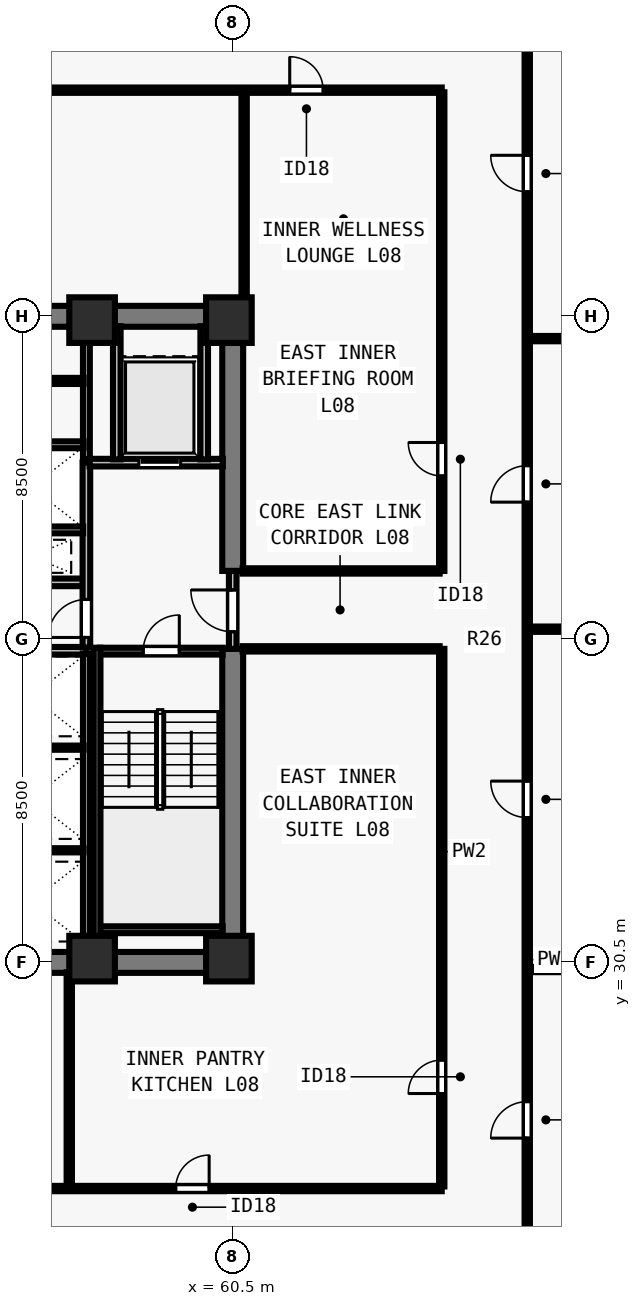
"""IFC4 building model, lengths in metres.
Left out: names, types, materials, properties, quantities, classifications, styles, units other than length and angle.
Written with IfcOpenShell. Run it as: python <this file> out.ifc"""

import sys

from ifc_helpers import new_model, si_unit, direction, frame, frame_2d, origin, origin_2d, place, context, subcontext, project, spatial, rectangle, extrude, element, fill, save


model = new_model("IFC4")
c1 = context("Model", 3, precision=1e-05, world=origin(), true_north=direction((0.0, 1.0)))
c2 = subcontext(c1, "Body", "Model", "MODEL_VIEW")
j1 = project(units=[si_unit("LENGTHUNIT", "METRE"), si_unit("PLANEANGLEUNIT", "RADIAN")], contexts=[c1])
p1 = place(None, origin())
s1 = spatial("IfcSite", under=j1, at=p1, CompositionType="ELEMENT")
p2 = place(p1, origin())
s2 = spatial("IfcBuilding", under=s1, at=p2, CompositionType="ELEMENT")
p3 = place(p2, frame((0.0, 0.0, 34.0)))
s3 = spatial("IfcBuildingStorey", under=s2, at=p3, CompositionType="ELEMENT", Elevation=34.0)
for number, where, z_axis, x_axis in (
    (1, (56.8, 30.6, 0.0), (0.0, 0.0, 1.0), (1.0, 0.0, 0.0)),
    (2, (60.4, 30.6, 0.0), (0.0, 0.0, 1.0), (1.0, 0.0, 0.0)),
    (3, (56.8, 47.4, 0.0), (0.0, 0.0, 1.0), (1.0, 0.0, 0.0)),
    (4, (60.4, 47.4, 0.0), (0.0, 0.0, 1.0), (1.0, 0.0, 0.0)),
):
    element("IfcColumn", number, at=place(p3, frame(where, z_axis=z_axis, x_axis=x_axis)), inside=s3, PredefinedType="COLUMN", context=c2, shape_type="SweptSolid", body=[
        extrude(rectangle(XDim=1.2, YDim=1.2, at=origin_2d()), origin(), (0.0, 0.0, 1.0), 3.5),
    ])
for number, where, z_axis, x_axis in (
    (5, (43.225, 30.5, 0.0), (0.0, 0.0, 1.0), (1.0, 0.0, 0.0)),
    (6, (43.225, 47.5, 0.0), (0.0, 0.0, 1.0), (1.0, 0.0, 0.0)),
):
    element("IfcWall", number, at=place(p3, frame(where, z_axis=z_axis, x_axis=x_axis)), inside=s3, PredefinedType="SHEAR", context=c2, shape_type="SweptSolid", body=[
        extrude(rectangle(XDim=17.55, YDim=0.55, at=frame_2d((8.775, 0.0))), origin(), (0.0, 0.0, 1.0), 3.28),
    ])
p4 = place(p3, frame((60.5, 30.765, 0.0), z_axis=(0.0, 0.0, 1.0), x_axis=(0.0, 1.0, 0.0)))
e7 = element("IfcWall", 7, at=p4, inside=s3, PredefinedType="SHEAR", context=c2, shape_type="SweptSolid", body=[
    extrude(rectangle(XDim=7.985, YDim=0.55, at=frame_2d((3.993, 0.0))), origin(), (0.0, 0.0, 1.0), 3.28),
])
p5 = place(p3, frame((60.5, 40.8, 0.0), z_axis=(0.0, 0.0, 1.0), x_axis=(0.0, 1.0, 0.0)))
e8 = element("IfcWall", 8, at=p5, inside=s3, PredefinedType="SHEAR", context=c2, shape_type="SweptSolid", body=[
    extrude(rectangle(XDim=6.435, YDim=0.55, at=frame_2d((3.218, 0.0))), origin(), (0.0, 0.0, 1.0), 3.28),
])
for number, where, z_axis, x_axis in (
    (9, (53.7, 38.7, 0.0), (0.0, 0.0, 1.0), (1.0, 0.0, 0.0)),
    (10, (53.7, 40.5, 0.0), (0.0, 0.0, 1.0), (1.0, 0.0, 0.0)),
):
    element("IfcWall", number, at=place(p3, frame(where, z_axis=z_axis, x_axis=x_axis)), inside=s3, PredefinedType="SOLIDWALL", context=c2, shape_type="SweptSolid", body=[
        extrude(rectangle(XDim=2.95, YDim=0.2, at=frame_2d((1.475, 0.0))), origin(), (0.0, 0.0, 1.0), 3.28),
    ])
p6 = place(p3, frame((60.5, 38.75, 0.0), z_axis=(0.0, 0.0, 1.0), x_axis=(0.0, 1.0, 0.0)))
e11 = element("IfcWall", 11, at=p6, inside=s3, PredefinedType="SOLIDWALL", context=c2, shape_type="SweptSolid", body=[
    extrude(rectangle(XDim=2.05, YDim=0.2, at=frame_2d((1.025, 0.0))), origin(), (0.0, 0.0, 1.0), 3.28),
])
p7 = place(p6, frame((0.45, 0.0, 0.0)))
e12 = element("IfcOpeningElement", 12, at=p7, cuts=e11, PredefinedType="OPENING", context=c2, shape_type="SweptSolid", body=[
    extrude(rectangle(XDim=1.1, YDim=2.15, at=frame_2d((0.55, 1.075))), frame((0.0, 0.11, 0.0), z_axis=(0.0, -1.0, 0.0), x_axis=(1.0, 0.0, 0.0)), (0.0, 0.0, 1.0), 0.22),
])
p8 = place(p3, frame((56.65, 38.785, 0.0), z_axis=(0.0, 0.0, 1.0), x_axis=(0.0, 1.0, 0.0)))
e13 = element("IfcWall", 13, at=p8, inside=s3, PredefinedType="SOLIDWALL", context=c2, shape_type="SweptSolid", body=[
    extrude(rectangle(XDim=4.865, YDim=0.2, at=frame_2d((2.433, 0.0))), origin(), (0.0, 0.0, 1.0), 3.28),
])
p9 = place(p8, frame((0.265, 0.0, 0.0)))
e14 = element("IfcOpeningElement", 14, at=p9, cuts=e13, PredefinedType="OPENING", context=c2, shape_type="SweptSolid", body=[
    extrude(rectangle(XDim=1.0, YDim=2.15, at=frame_2d((0.5, 1.075))), frame((0.0, 0.11, 0.0), z_axis=(0.0, -1.0, 0.0), x_axis=(1.0, 0.0, 0.0)), (0.0, 0.0, 1.0), 0.22),
])
p10 = place(p3, frame((56.735, 43.65, 0.0), z_axis=(0.0, 0.0, 1.0), x_axis=(1.0, 0.0, 0.0)))
e15 = element("IfcWall", 15, at=p10, inside=s3, PredefinedType="SOLIDWALL", context=c2, shape_type="SweptSolid", body=[
    extrude(rectangle(XDim=3.505, YDim=0.2, at=frame_2d((1.752, 0.0))), origin(), (0.0, 0.0, 1.0), 3.28),
])
p11 = place(p10, frame((1.295, 0.0, 0.0)))
e16 = element("IfcOpeningElement", 16, at=p11, cuts=e15, PredefinedType="OPENING", context=c2, shape_type="SweptSolid", body=[
    extrude(rectangle(XDim=1.1, YDim=2.2, at=frame_2d((0.55, 1.1))), frame((0.0, 0.11, 0.0), z_axis=(0.0, -1.0, 0.0), x_axis=(1.0, 0.0, 0.0)), (0.0, 0.0, 1.0), 0.22),
])
for number, where, z_axis, x_axis in (
    (17, (57.45, 43.735, 0.0), (0.0, 0.0, 1.0), (0.0, 1.0, 0.0)),
    (18, (59.75, 43.735, 0.0), (0.0, 0.0, 1.0), (0.0, 1.0, 0.0)),
):
    element("IfcWall", number, at=place(p3, frame(where, z_axis=z_axis, x_axis=x_axis)), inside=s3, PredefinedType="SOLIDWALL", context=c2, shape_type="SweptSolid", body=[
        extrude(rectangle(XDim=3.505, YDim=0.2, at=frame_2d((1.752, 0.0))), origin(), (0.0, 0.0, 1.0), 3.28),
    ])
p12 = place(p3, frame((56.65, 30.76, 0.0), z_axis=(0.0, 0.0, 1.0), x_axis=(0.0, 1.0, 0.0)))
e19 = element("IfcWall", 19, at=p12, inside=s3, PredefinedType="SOLIDWALL", context=c2, shape_type="SweptSolid", body=[
    extrude(rectangle(XDim=7.855, YDim=0.18, at=frame_2d((3.927, 0.0))), origin(), (0.0, 0.0, 1.0), 3.28),
])
for number, where, z_axis, x_axis in (
    (20, (53.785, 33.45, 0.0), (0.0, 0.0, 1.0), (1.0, 0.0, 0.0)),
    (21, (53.785, 36.15, 0.0), (0.0, 0.0, 1.0), (1.0, 0.0, 0.0)),
):
    element("IfcWall", number, at=place(p3, frame(where, z_axis=z_axis, x_axis=x_axis)), inside=s3, PredefinedType="PARTITIONING", context=c2, shape_type="SweptSolid", body=[
        extrude(rectangle(XDim=2.79, YDim=0.11, at=frame_2d((1.395, 0.0))), origin(), (0.0, 0.0, 1.0), 3.28),
    ])
p13 = place(p3, frame((56.65, 43.735, 0.0), z_axis=(0.0, 0.0, 1.0), x_axis=(0.0, 1.0, 0.0)))
e22 = element("IfcWall", 22, at=p13, inside=s3, PredefinedType="SOLIDWALL", context=c2, shape_type="SweptSolid", body=[
    extrude(rectangle(XDim=3.505, YDim=0.18, at=frame_2d((1.752, 0.0))), origin(), (0.0, 0.0, 1.0), 3.28),
])
p14 = place(p3, frame((53.785, 41.88, 0.0), z_axis=(0.0, 0.0, 1.0), x_axis=(1.0, 0.0, 0.0)))
e23 = element("IfcWall", 23, at=p14, inside=s3, PredefinedType="SOLIDWALL", context=c2, shape_type="SweptSolid", body=[
    extrude(rectangle(XDim=2.78, YDim=0.18, at=frame_2d((1.39, 0.0))), origin(), (0.0, 0.0, 1.0), 3.28),
])
p15 = place(p3, frame((53.785, 44.12, 0.0), z_axis=(0.0, 0.0, 1.0), x_axis=(1.0, 0.0, 0.0)))
e24 = element("IfcWall", 24, at=p15, inside=s3, PredefinedType="SOLIDWALL", context=c2, shape_type="SweptSolid", body=[
    extrude(rectangle(XDim=2.79, YDim=0.18, at=frame_2d((1.395, 0.0))), origin(), (0.0, 0.0, 1.0), 3.28),
])
p16 = place(p3, frame((53.785, 45.8, 0.0), z_axis=(0.0, 0.0, 1.0), x_axis=(1.0, 0.0, 0.0)))
e25 = element("IfcWall", 25, at=p16, inside=s3, PredefinedType="PARTITIONING", context=c2, shape_type="SweptSolid", body=[
    extrude(rectangle(XDim=2.79, YDim=0.16, at=frame_2d((1.395, 0.0))), origin(), (0.0, 0.0, 1.0), 3.28),
])
p17 = place(p3, frame((68.25, 22.355, 0.0), z_axis=(0.0, 0.0, 1.0), x_axis=(0.0, 1.0, 0.0)))
e26 = element("IfcWall", 26, at=p17, inside=s3, PredefinedType="PARTITIONING", context=c2, shape_type="SweptSolid", body=[
    extrude(rectangle(XDim=33.29, YDim=0.14, at=frame_2d((16.645, 0.0))), origin(), (0.0, 0.0, 1.0), 3.28),
])
p18 = place(p17, frame((3.522, 0.0, 0.0)))
e27 = element("IfcOpeningElement", 27, at=p18, cuts=e26, PredefinedType="OPENING", context=c2, shape_type="SweptSolid", body=[
    extrude(rectangle(XDim=0.96, YDim=2.12, at=frame_2d((0.48, 1.06))), frame((0.0, 0.08, 0.0), z_axis=(0.0, -1.0, 0.0), x_axis=(1.0, 0.0, 0.0)), (0.0, 0.0, 1.0), 0.16),
])
p19 = place(p17, frame((11.956, 0.0, 0.0)))
e28 = element("IfcOpeningElement", 28, at=p19, cuts=e26, PredefinedType="OPENING", context=c2, shape_type="SweptSolid", body=[
    extrude(rectangle(XDim=0.96, YDim=2.12, at=frame_2d((0.48, 1.06))), frame((0.0, 0.08, 0.0), z_axis=(0.0, -1.0, 0.0), x_axis=(1.0, 0.0, 0.0)), (0.0, 0.0, 1.0), 0.16),
])
p20 = place(p17, frame((20.256, 0.0, 0.0)))
e29 = element("IfcOpeningElement", 29, at=p20, cuts=e26, PredefinedType="OPENING", context=c2, shape_type="SweptSolid", body=[
    extrude(rectangle(XDim=0.96, YDim=2.12, at=frame_2d((0.48, 1.06))), frame((0.0, 0.08, 0.0), z_axis=(0.0, -1.0, 0.0), x_axis=(1.0, 0.0, 0.0)), (0.0, 0.0, 1.0), 0.16),
])
p21 = place(p17, frame((28.422, 0.0, 0.0)))
e30 = element("IfcOpeningElement", 30, at=p21, cuts=e26, PredefinedType="OPENING", context=c2, shape_type="SweptSolid", body=[
    extrude(rectangle(XDim=0.96, YDim=2.12, at=frame_2d((0.48, 1.06))), frame((0.0, 0.08, 0.0), z_axis=(0.0, -1.0, 0.0), x_axis=(1.0, 0.0, 0.0)), (0.0, 0.0, 1.0), 0.16),
])
p22 = place(p3, frame((38.0, 24.55, 0.0), z_axis=(0.0, 0.0, 1.0), x_axis=(1.0, 0.0, 0.0)))
e31 = element("IfcWall", 31, at=p22, inside=s3, PredefinedType="PARTITIONING", context=c2, shape_type="SweptSolid", body=[
    extrude(rectangle(XDim=28.0, YDim=0.14, at=frame_2d((14.0, 0.0))), origin(), (0.0, 0.0, 1.0), 3.28),
])
p23 = place(p22, frame((1.2, 0.0, 0.0)))
e32 = element("IfcOpeningElement", 32, at=p23, cuts=e31, PredefinedType="OPENING", context=c2, shape_type="SweptSolid", body=[
    extrude(rectangle(XDim=0.88, YDim=2.1, at=frame_2d((0.44, 1.05))), frame((0.0, 0.08, 0.0), z_axis=(0.0, -1.0, 0.0), x_axis=(1.0, 0.0, 0.0)), (0.0, 0.0, 1.0), 0.16),
])
p24 = place(p22, frame((10.5, 0.0, 0.0)))
e33 = element("IfcOpeningElement", 33, at=p24, cuts=e31, PredefinedType="OPENING", context=c2, shape_type="SweptSolid", body=[
    extrude(rectangle(XDim=0.88, YDim=2.1, at=frame_2d((0.44, 1.05))), frame((0.0, 0.08, 0.0), z_axis=(0.0, -1.0, 0.0), x_axis=(1.0, 0.0, 0.0)), (0.0, 0.0, 1.0), 0.16),
])
p25 = place(p22, frame((21.0, 0.0, 0.0)))
e34 = element("IfcOpeningElement", 34, at=p25, cuts=e31, PredefinedType="OPENING", context=c2, shape_type="SweptSolid", body=[
    extrude(rectangle(XDim=0.88, YDim=2.1, at=frame_2d((0.44, 1.05))), frame((0.0, 0.08, 0.0), z_axis=(0.0, -1.0, 0.0), x_axis=(1.0, 0.0, 0.0)), (0.0, 0.0, 1.0), 0.16),
])
p26 = place(p3, frame((38.0, 53.45, 0.0), z_axis=(0.0, 0.0, 1.0), x_axis=(1.0, 0.0, 0.0)))
e35 = element("IfcWall", 35, at=p26, inside=s3, PredefinedType="PARTITIONING", context=c2, shape_type="SweptSolid", body=[
    extrude(rectangle(XDim=28.0, YDim=0.14, at=frame_2d((14.0, 0.0))), origin(), (0.0, 0.0, 1.0), 3.28),
])
p27 = place(p26, frame((2.2, 0.0, 0.0)))
e36 = element("IfcOpeningElement", 36, at=p27, cuts=e35, PredefinedType="OPENING", context=c2, shape_type="SweptSolid", body=[
    extrude(rectangle(XDim=0.88, YDim=2.1, at=frame_2d((0.44, 1.05))), frame((0.0, 0.08, 0.0), z_axis=(0.0, -1.0, 0.0), x_axis=(1.0, 0.0, 0.0)), (0.0, 0.0, 1.0), 0.16),
])
p28 = place(p26, frame((14.5, 0.0, 0.0)))
e37 = element("IfcOpeningElement", 37, at=p28, cuts=e35, PredefinedType="OPENING", context=c2, shape_type="SweptSolid", body=[
    extrude(rectangle(XDim=0.88, YDim=2.1, at=frame_2d((0.44, 1.05))), frame((0.0, 0.08, 0.0), z_axis=(0.0, -1.0, 0.0), x_axis=(1.0, 0.0, 0.0)), (0.0, 0.0, 1.0), 0.16),
])
p29 = place(p26, frame((24.0, 0.0, 0.0)))
e38 = element("IfcOpeningElement", 38, at=p29, cuts=e35, PredefinedType="OPENING", context=c2, shape_type="SweptSolid", body=[
    extrude(rectangle(XDim=0.88, YDim=2.1, at=frame_2d((0.44, 1.05))), frame((0.0, 0.08, 0.0), z_axis=(0.0, -1.0, 0.0), x_axis=(1.0, 0.0, 0.0)), (0.0, 0.0, 1.0), 0.16),
])
p30 = place(p3, frame((66.0, 24.605, 0.0), z_axis=(0.0, 0.0, 1.0), x_axis=(0.0, 1.0, 0.0)))
e39 = element("IfcWall", 39, at=p30, inside=s3, PredefinedType="PARTITIONING", context=c2, shape_type="SweptSolid", body=[
    extrude(rectangle(XDim=14.145, YDim=0.14, at=frame_2d((7.073, 0.0))), origin(), (0.0, 0.0, 1.0), 3.28),
])
p31 = place(p30, frame((2.445, 0.0, 0.0)))
e40 = element("IfcOpeningElement", 40, at=p31, cuts=e39, PredefinedType="OPENING", context=c2, shape_type="SweptSolid", body=[
    extrude(rectangle(XDim=0.88, YDim=2.1, at=frame_2d((0.44, 1.05))), frame((0.0, 0.08, 0.0), z_axis=(0.0, -1.0, 0.0), x_axis=(1.0, 0.0, 0.0)), (0.0, 0.0, 1.0), 0.16),
])
p32 = place(p3, frame((66.0, 40.8, 0.0), z_axis=(0.0, 0.0, 1.0), x_axis=(0.0, 1.0, 0.0)))
e41 = element("IfcWall", 41, at=p32, inside=s3, PredefinedType="PARTITIONING", context=c2, shape_type="SweptSolid", body=[
    extrude(rectangle(XDim=12.595, YDim=0.14, at=frame_2d((6.297, 0.0))), origin(), (0.0, 0.0, 1.0), 3.28),
])
p33 = place(p32, frame((2.5, 0.0, 0.0)))
e42 = element("IfcOpeningElement", 42, at=p33, cuts=e41, PredefinedType="OPENING", context=c2, shape_type="SweptSolid", body=[
    extrude(rectangle(XDim=0.88, YDim=2.1, at=frame_2d((0.44, 1.05))), frame((0.0, 0.08, 0.0), z_axis=(0.0, -1.0, 0.0), x_axis=(1.0, 0.0, 0.0)), (0.0, 0.0, 1.0), 0.16),
])
for number, where, z_axis, x_axis in (
    (43, (60.76, 38.75, 0.0), (0.0, 0.0, 1.0), (1.0, 0.0, 0.0)),
    (44, (60.76, 40.8, 0.0), (0.0, 0.0, 1.0), (1.0, 0.0, 0.0)),
):
    element("IfcWall", number, at=place(p3, frame(where, z_axis=z_axis, x_axis=x_axis)), inside=s3, PredefinedType="PARTITIONING", context=c2, shape_type="SweptSolid", body=[
        extrude(rectangle(XDim=5.185, YDim=0.14, at=frame_2d((2.593, 0.0))), origin(), (0.0, 0.0, 1.0), 3.28),
    ])
p34 = place(p3, frame((56.2, 24.605, 0.0), z_axis=(0.0, 0.0, 1.0), x_axis=(0.0, 1.0, 0.0)))
e45 = element("IfcWall", 45, at=p34, inside=s3, PredefinedType="PARTITIONING", context=c2, shape_type="SweptSolid", body=[
    extrude(rectangle(XDim=5.635, YDim=0.14, at=frame_2d((2.817, 0.0))), origin(), (0.0, 0.0, 1.0), 2.849),
])
p35 = place(p3, frame((60.8, 47.76, 0.0), z_axis=(0.0, 0.0, 1.0), x_axis=(0.0, 1.0, 0.0)))
e46 = element("IfcWall", 46, at=p35, inside=s3, PredefinedType="PARTITIONING", context=c2, shape_type="SweptSolid", body=[
    extrude(rectangle(XDim=5.635, YDim=0.14, at=frame_2d((2.817, 0.0))), origin(), (0.0, 0.0, 1.0), 2.439),
])
for number, where, z_axis, x_axis in (
    (47, (68.35, 30.313, 0.0), (0.0, 0.0, 1.0), (1.0, 0.0, 0.0)),
    (48, (68.35, 39.268, 0.0), (0.0, 0.0, 1.0), (1.0, 0.0, 0.0)),
    (49, (68.35, 46.913, 0.0), (0.0, 0.0, 1.0), (1.0, 0.0, 0.0)),
):
    element("IfcWall", number, at=place(p3, frame(where, z_axis=z_axis, x_axis=x_axis)), inside=s3, PredefinedType="PARTITIONING", context=c2, shape_type="SweptSolid", body=[
        extrude(rectangle(XDim=8.73, YDim=0.14, at=frame_2d((4.365, 0.0))), origin(), (0.0, 0.0, 1.0), 3.28),
    ])
p36 = place(p3, frame((57.005, 38.69, 0.0), z_axis=(0.0, 0.0, 1.0), x_axis=(1.0, 0.0, 0.0)))
e50 = element("IfcWall", 50, at=p36, inside=s3, PredefinedType="SOLIDWALL", context=c2, shape_type="SweptSolid", body=[
    extrude(rectangle(XDim=3.23, YDim=0.18, at=frame_2d((1.615, 0.0))), origin(), (0.0, 0.0, 1.0), 3.28),
])
p37 = place(p36, frame((1.14, 0.0, 0.0)))
e51 = element("IfcOpeningElement", 51, at=p37, cuts=e50, PredefinedType="OPENING", context=c2, shape_type="SweptSolid", body=[
    extrude(rectangle(XDim=0.95, YDim=2.15, at=frame_2d((0.475, 1.075))), frame((0.0, 0.1, 0.0), z_axis=(0.0, -1.0, 0.0), x_axis=(1.0, 0.0, 0.0)), (0.0, 0.0, 1.0), 0.2),
])
p38 = place(p3, frame((57.005, 31.36, 0.0), z_axis=(0.0, 0.0, 1.0), x_axis=(1.0, 0.0, 0.0)))
e52 = element("IfcWall", 52, at=p38, inside=s3, PredefinedType="SOLIDWALL", context=c2, shape_type="SweptSolid", body=[
    extrude(rectangle(XDim=3.23, YDim=0.18, at=frame_2d((1.615, 0.0))), origin(), (0.0, 0.0, 1.0), 3.28),
])
p39 = place(p3, frame((56.93, 38.78, 0.0), z_axis=(0.0, 0.0, 1.0), x_axis=(0.0, -1.0, 0.0)))
e53 = element("IfcWall", 53, at=p39, inside=s3, PredefinedType="SOLIDWALL", context=c2, shape_type="SweptSolid", body=[
    extrude(rectangle(XDim=8.017, YDim=0.18, at=frame_2d((4.009, 0.0))), origin(), (0.0, 0.0, 1.0), 3.28),
])
p40 = place(p7, origin())
e54 = element("IfcDoor", 54, at=p40, inside=s3, OperationType="SINGLE_SWING_RIGHT", PredefinedType="DOOR", context=c2, shape_type="SweptSolid", body=[
    extrude(rectangle(XDim=1.1, YDim=2.15, at=frame_2d((0.55, 1.075))), frame((0.0, 0.025, 0.0), z_axis=(0.0, -1.0, 0.0), x_axis=(1.0, 0.0, 0.0)), (0.0, 0.0, 1.0), 0.05),
])
fill(e12, e54)
p41 = place(p9, origin())
e55 = element("IfcDoor", 55, at=p41, inside=s3, OperationType="SINGLE_SWING_LEFT", PredefinedType="DOOR", context=c2, shape_type="SweptSolid", body=[
    extrude(rectangle(XDim=1.0, YDim=2.15, at=frame_2d((0.5, 1.075))), frame((0.0, 0.025, 0.0), z_axis=(0.0, -1.0, 0.0), x_axis=(1.0, 0.0, 0.0)), (0.0, 0.0, 1.0), 0.05),
])
fill(e14, e55)
p42 = place(p11, origin())
e56 = element("IfcDoor", 56, at=p42, inside=s3, OperationType="SLIDING_TO_LEFT", PredefinedType="DOOR", context=c2, shape_type="SweptSolid", body=[
    extrude(rectangle(XDim=1.1, YDim=2.2, at=frame_2d((0.55, 1.1))), frame((0.0, 0.025, 0.0), z_axis=(0.0, -1.0, 0.0), x_axis=(1.0, 0.0, 0.0)), (0.0, 0.0, 1.0), 0.05),
])
fill(e16, e56)
p43 = place(p25, origin())
e57 = element("IfcDoor", 57, at=p43, inside=s3, OperationType="SINGLE_SWING_RIGHT", PredefinedType="DOOR", context=c2, shape_type="SweptSolid", body=[
    extrude(rectangle(XDim=0.88, YDim=2.1, at=frame_2d((0.44, 1.05))), frame((0.0, 0.025, 0.0), z_axis=(0.0, -1.0, 0.0), x_axis=(1.0, 0.0, 0.0)), (0.0, 0.0, 1.0), 0.05),
])
fill(e34, e57)
p44 = place(p29, origin())
e58 = element("IfcDoor", 58, at=p44, inside=s3, OperationType="SINGLE_SWING_LEFT", PredefinedType="DOOR", context=c2, shape_type="SweptSolid", body=[
    extrude(rectangle(XDim=0.88, YDim=2.1, at=frame_2d((0.44, 1.05))), frame((0.0, 0.025, 0.0), z_axis=(0.0, -1.0, 0.0), x_axis=(1.0, 0.0, 0.0)), (0.0, 0.0, 1.0), 0.05),
])
fill(e38, e58)
p45 = place(p31, origin())
e59 = element("IfcDoor", 59, at=p45, inside=s3, OperationType="SINGLE_SWING_LEFT", PredefinedType="DOOR", context=c2, shape_type="SweptSolid", body=[
    extrude(rectangle(XDim=0.88, YDim=2.1, at=frame_2d((0.44, 1.05))), frame((0.0, 0.025, 0.0), z_axis=(0.0, -1.0, 0.0), x_axis=(1.0, 0.0, 0.0)), (0.0, 0.0, 1.0), 0.05),
])
fill(e40, e59)
p46 = place(p33, origin())
e60 = element("IfcDoor", 60, at=p46, inside=s3, OperationType="SINGLE_SWING_RIGHT", PredefinedType="DOOR", context=c2, shape_type="SweptSolid", body=[
    extrude(rectangle(XDim=0.88, YDim=2.1, at=frame_2d((0.44, 1.05))), frame((0.0, 0.025, 0.0), z_axis=(0.0, -1.0, 0.0), x_axis=(1.0, 0.0, 0.0)), (0.0, 0.0, 1.0), 0.05),
])
fill(e42, e60)
p47 = place(p18, origin())
e61 = element("IfcDoor", 61, at=p47, inside=s3, OperationType="SINGLE_SWING_LEFT", PredefinedType="DOOR", context=c2, shape_type="SweptSolid", body=[
    extrude(rectangle(XDim=0.96, YDim=2.12, at=frame_2d((0.48, 1.06))), frame((0.0, 0.025, 0.0), z_axis=(0.0, -1.0, 0.0), x_axis=(1.0, 0.0, 0.0)), (0.0, 0.0, 1.0), 0.05),
])
fill(e27, e61)
p48 = place(p19, origin())
e62 = element("IfcDoor", 62, at=p48, inside=s3, OperationType="SINGLE_SWING_RIGHT", PredefinedType="DOOR", context=c2, shape_type="SweptSolid", body=[
    extrude(rectangle(XDim=0.96, YDim=2.12, at=frame_2d((0.48, 1.06))), frame((0.0, 0.025, 0.0), z_axis=(0.0, -1.0, 0.0), x_axis=(1.0, 0.0, 0.0)), (0.0, 0.0, 1.0), 0.05),
])
fill(e28, e62)
p49 = place(p20, origin())
e63 = element("IfcDoor", 63, at=p49, inside=s3, OperationType="SINGLE_SWING_LEFT", PredefinedType="DOOR", context=c2, shape_type="SweptSolid", body=[
    extrude(rectangle(XDim=0.96, YDim=2.12, at=frame_2d((0.48, 1.06))), frame((0.0, 0.025, 0.0), z_axis=(0.0, -1.0, 0.0), x_axis=(1.0, 0.0, 0.0)), (0.0, 0.0, 1.0), 0.05),
])
fill(e29, e63)
p50 = place(p21, origin())
e64 = element("IfcDoor", 64, at=p50, inside=s3, OperationType="SINGLE_SWING_RIGHT", PredefinedType="DOOR", context=c2, shape_type="SweptSolid", body=[
    extrude(rectangle(XDim=0.96, YDim=2.12, at=frame_2d((0.48, 1.06))), frame((0.0, 0.025, 0.0), z_axis=(0.0, -1.0, 0.0), x_axis=(1.0, 0.0, 0.0)), (0.0, 0.0, 1.0), 0.05),
])
fill(e30, e64)
p51 = place(p37, origin())
e65 = element("IfcDoor", 65, at=p51, inside=s3, OperationType="SINGLE_SWING_RIGHT", PredefinedType="DOOR", context=c2, shape_type="SweptSolid", body=[
    extrude(rectangle(XDim=0.95, YDim=2.15, at=frame_2d((0.475, 1.075))), frame((0.0, 0.025, 0.0), z_axis=(0.0, -1.0, 0.0), x_axis=(1.0, 0.0, 0.0)), (0.0, 0.0, 1.0), 0.05),
])
fill(e51, e65)
save(model, sys.argv[1])
